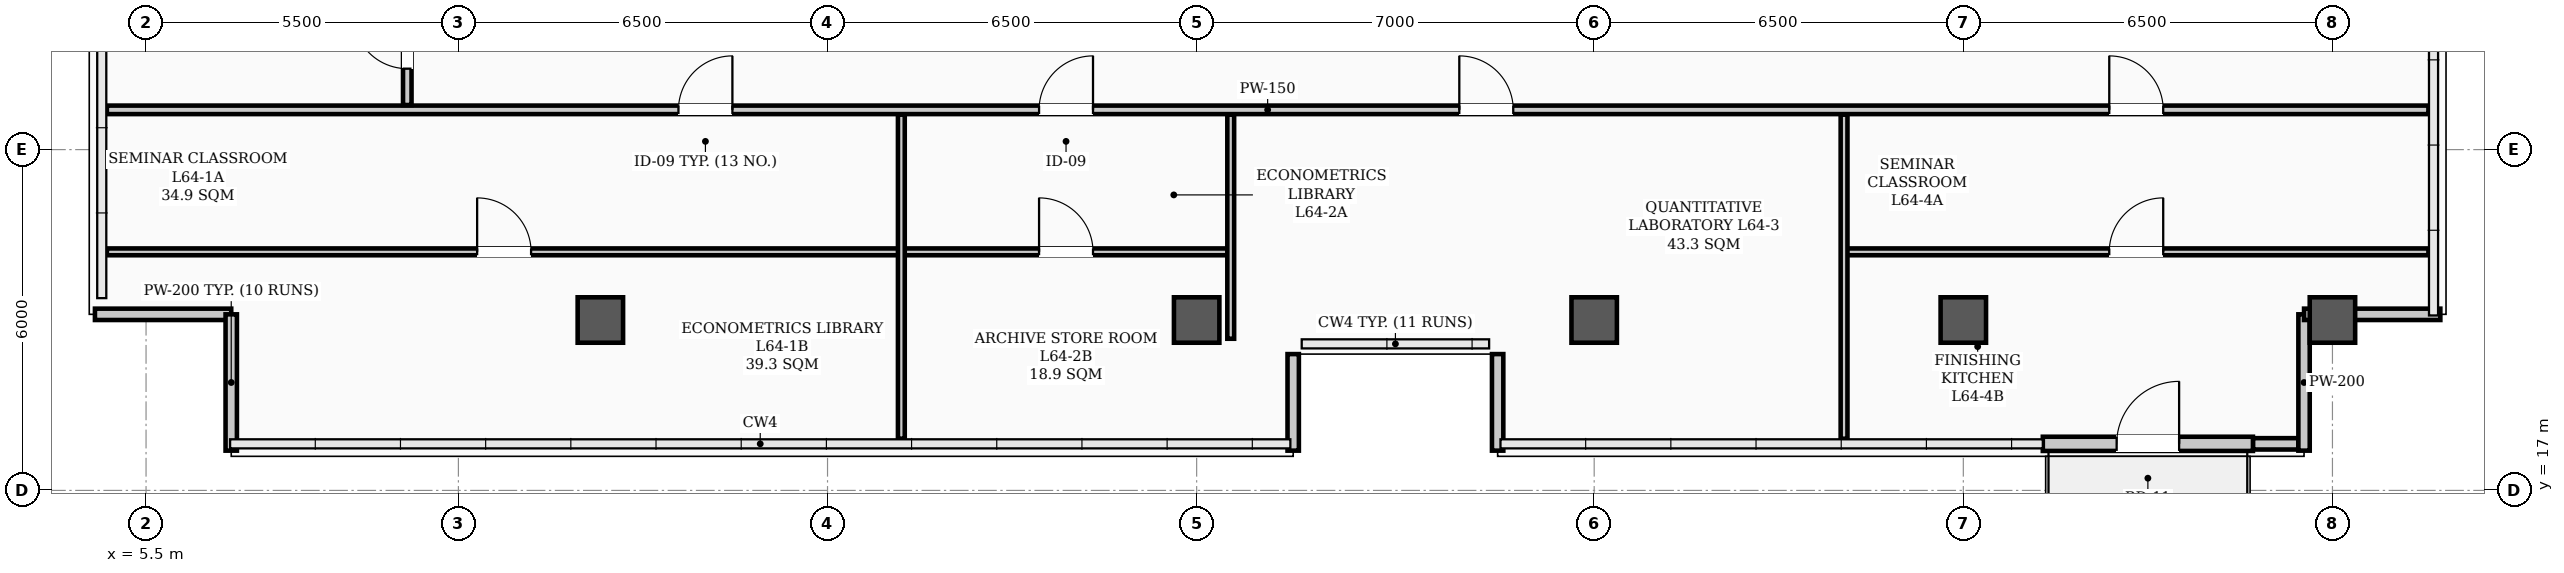
"""IFC4 building model, lengths in metres.
Left out: names, types, materials, properties, quantities, classifications, styles, units other than length and angle.
Written with IfcOpenShell. Run it as: python <this file> out.ifc"""

import sys

from ifc_helpers import new_model, si_unit, direction, frame, frame_2d, origin, origin_2d, place, context, subcontext, project, spatial, rectangle, hollow_rectangle, extrude, element, fill, save


model = new_model("IFC4")
c1 = context("Model", 3, precision=1e-05, world=origin(), true_north=direction((0.0, 1.0)))
c2 = subcontext(c1, "Body", "Model", "MODEL_VIEW")
j1 = project(units=[si_unit("LENGTHUNIT", "METRE"), si_unit("PLANEANGLEUNIT", "RADIAN")], contexts=[c1])
p1 = place(None, origin())
s1 = spatial("IfcSite", under=j1, at=p1, CompositionType="ELEMENT")
p2 = place(p1, origin())
s2 = spatial("IfcBuilding", under=s1, at=p2, CompositionType="ELEMENT")
p3 = place(p2, frame((0.0, 0.0, 257.9)))
s3 = spatial("IfcBuildingStorey", under=s2, at=p3, CompositionType="ELEMENT", Elevation=257.9)
for number, where, z_axis, x_axis in (
    (1, (13.5, 20.0, 0.0), (0.0, 0.0, 1.0), (1.0, 0.0, 0.0)),
    (2, (24.0, 20.0, 0.0), (0.0, 0.0, 1.0), (1.0, 0.0, 0.0)),
    (3, (31.0, 20.0, 0.0), (0.0, 0.0, 1.0), (1.0, 0.0, 0.0)),
    (4, (37.5, 20.0, 0.0), (0.0, 0.0, 1.0), (1.0, 0.0, 0.0)),
    (5, (44.0, 20.0, 0.0), (0.0, 0.0, 1.0), (1.0, 0.0, 0.0)),
):
    element("IfcColumn", number, at=place(p3, frame(where, z_axis=z_axis, x_axis=x_axis)), inside=s3, PredefinedType="COLUMN", context=c2, shape_type="SweptSolid", body=[
        extrude(hollow_rectangle(XDim=0.8, YDim=0.8, WallThickness=0.032, InnerFilletRadius=0.016, OuterFilletRadius=0.048, at=origin_2d()), origin(), (0.0, 0.0, 1.0), 3.9),
    ])
p4 = place(p3, frame((42.6, 17.82, 0.0), z_axis=(0.0, 0.0, 1.0), x_axis=(1.0, 0.0, 0.0)))
e6 = element("IfcWall", 6, at=p4, inside=s3, PredefinedType="PARAPET", context=c2, shape_type="SweptSolid", body=[
    extrude(rectangle(XDim=0.8, YDim=0.2, at=frame_2d((0.4, 0.0))), origin(), (0.0, 0.0, 1.0), 1.2),
])
p5 = place(p3, frame((4.6, 20.1, 0.0), z_axis=(0.0, 0.0, 1.0), x_axis=(1.0, 0.0, 0.0)))
e7 = element("IfcWall", 7, at=p5, inside=s3, PredefinedType="PARAPET", context=c2, shape_type="SweptSolid", body=[
    extrude(rectangle(XDim=2.4, YDim=0.2, at=frame_2d((1.2, 0.0))), origin(), (0.0, 0.0, 1.0), 1.2),
])
for number, where, z_axis, x_axis in (
    (8, (7.0, 20.1, 0.0), (0.0, 0.0, 1.0), (0.0, -1.0, 0.0)),
    (9, (43.5, 17.7, 0.0), (0.0, 0.0, 1.0), (0.0, 1.0, 0.0)),
):
    element("IfcWall", number, at=place(p3, frame(where, z_axis=z_axis, x_axis=x_axis)), inside=s3, PredefinedType="PARAPET", context=c2, shape_type="SweptSolid", body=[
        extrude(rectangle(XDim=2.4, YDim=0.2, at=frame_2d((1.2, 0.0))), origin(), (0.0, 0.0, 1.0), 1.2),
    ])
p6 = place(p3, frame((43.5, 20.1, 0.0), z_axis=(0.0, 0.0, 1.0), x_axis=(1.0, 0.0, 0.0)))
e10 = element("IfcWall", 10, at=p6, inside=s3, PredefinedType="PARAPET", context=c2, shape_type="SweptSolid", body=[
    extrude(rectangle(XDim=2.4, YDim=0.2, at=frame_2d((1.2, 0.0))), origin(), (0.0, 0.0, 1.0), 1.2),
])
for number, where, z_axis, x_axis in (
    (11, (25.7, 17.7, 0.0), (0.0, 0.0, 1.0), (0.0, 1.0, 0.0)),
    (12, (29.3, 19.4, 0.0), (0.0, 0.0, 1.0), (0.0, -1.0, 0.0)),
):
    element("IfcWall", number, at=place(p3, frame(where, z_axis=z_axis, x_axis=x_axis)), inside=s3, PredefinedType="PARAPET", context=c2, shape_type="SweptSolid", body=[
        extrude(rectangle(XDim=1.7, YDim=0.2, at=frame_2d((0.85, 0.0))), origin(), (0.0, 0.0, 1.0), 1.2),
    ])
p7 = place(p3, frame((38.9, 17.82, 0.0), z_axis=(0.0, 0.0, 1.0), x_axis=(1.0, 0.0, 0.0)))
e13 = element("IfcWall", 13, at=p7, inside=s3, PredefinedType="STANDARD", context=c2, shape_type="SweptSolid", body=[
    extrude(rectangle(XDim=3.7, YDim=0.25, at=frame_2d((1.85, 0.0))), origin(), (0.0, 0.0, 1.0), 3.18),
])
p8 = place(p7, frame((1.3, 0.0, 0.0)))
e14 = element("IfcOpeningElement", 14, at=p8, cuts=e13, PredefinedType="OPENING", context=c2, shape_type="SweptSolid", body=[
    extrude(rectangle(XDim=1.1, YDim=2.2, at=frame_2d((0.55, 1.1))), frame((0.0, 0.135, 0.0), z_axis=(0.0, -1.0, 0.0), x_axis=(1.0, 0.0, 0.0)), (0.0, 0.0, 1.0), 0.27),
])
p9 = place(p3, frame((4.81, 23.7, 0.0), z_axis=(0.0, 0.0, 1.0), x_axis=(1.0, 0.0, 0.0)))
e15 = element("IfcWall", 15, at=p9, inside=s3, PredefinedType="PARTITIONING", context=c2, shape_type="SweptSolid", body=[
    extrude(rectangle(XDim=40.88, YDim=0.15, at=frame_2d((20.44, 0.0))), origin(), (0.0, 0.0, 1.0), 3.2),
])
p10 = place(p9, frame((10.065, 0.0, 0.0)))
e16 = element("IfcOpeningElement", 16, at=p10, cuts=e15, PredefinedType="OPENING", context=c2, shape_type="SweptSolid", body=[
    extrude(rectangle(XDim=0.95, YDim=2.08, at=frame_2d((0.475, 1.04))), frame((0.0, 0.085, 0.0), z_axis=(0.0, -1.0, 0.0), x_axis=(1.0, 0.0, 0.0)), (0.0, 0.0, 1.0), 0.17),
])
p11 = place(p9, frame((16.415, 0.0, 0.0)))
e17 = element("IfcOpeningElement", 17, at=p11, cuts=e15, PredefinedType="OPENING", context=c2, shape_type="SweptSolid", body=[
    extrude(rectangle(XDim=0.95, YDim=2.08, at=frame_2d((0.475, 1.04))), frame((0.0, 0.085, 0.0), z_axis=(0.0, -1.0, 0.0), x_axis=(1.0, 0.0, 0.0)), (0.0, 0.0, 1.0), 0.17),
])
p12 = place(p9, frame((23.815, 0.0, 0.0)))
e18 = element("IfcOpeningElement", 18, at=p12, cuts=e15, PredefinedType="OPENING", context=c2, shape_type="SweptSolid", body=[
    extrude(rectangle(XDim=0.95, YDim=2.08, at=frame_2d((0.475, 1.04))), frame((0.0, 0.085, 0.0), z_axis=(0.0, -1.0, 0.0), x_axis=(1.0, 0.0, 0.0)), (0.0, 0.0, 1.0), 0.17),
])
p13 = place(p9, frame((35.26, 0.0, 0.0)))
e19 = element("IfcOpeningElement", 19, at=p13, cuts=e15, PredefinedType="OPENING", context=c2, shape_type="SweptSolid", body=[
    extrude(rectangle(XDim=0.95, YDim=2.08, at=frame_2d((0.475, 1.04))), frame((0.0, 0.085, 0.0), z_axis=(0.0, -1.0, 0.0), x_axis=(1.0, 0.0, 0.0)), (0.0, 0.0, 1.0), 0.17),
])
p14 = place(p3, frame((4.81, 21.2, 0.0), z_axis=(0.0, 0.0, 1.0), x_axis=(1.0, 0.0, 0.0)))
e20 = element("IfcWall", 20, at=p14, inside=s3, PredefinedType="PARTITIONING", context=c2, shape_type="SweptSolid", body=[
    extrude(rectangle(XDim=13.99, YDim=0.12, at=frame_2d((6.995, 0.0))), origin(), (0.0, 0.0, 1.0), 3.2),
])
p15 = place(p14, frame((6.52, 0.0, 0.0)))
e21 = element("IfcOpeningElement", 21, at=p15, cuts=e20, PredefinedType="OPENING", context=c2, shape_type="SweptSolid", body=[
    extrude(rectangle(XDim=0.95, YDim=2.08, at=frame_2d((0.475, 1.04))), frame((0.0, 0.07, 0.0), z_axis=(0.0, -1.0, 0.0), x_axis=(1.0, 0.0, 0.0)), (0.0, 0.0, 1.0), 0.14),
])
p16 = place(p3, frame((18.8, 21.2, 0.0), z_axis=(0.0, 0.0, 1.0), x_axis=(1.0, 0.0, 0.0)))
e22 = element("IfcWall", 22, at=p16, inside=s3, PredefinedType="PARTITIONING", context=c2, shape_type="SweptSolid", body=[
    extrude(rectangle(XDim=5.8, YDim=0.12, at=frame_2d((2.9, 0.0))), origin(), (0.0, 0.0, 1.0), 3.2),
])
p17 = place(p16, frame((2.425, 0.0, 0.0)))
e23 = element("IfcOpeningElement", 23, at=p17, cuts=e22, PredefinedType="OPENING", context=c2, shape_type="SweptSolid", body=[
    extrude(rectangle(XDim=0.95, YDim=2.08, at=frame_2d((0.475, 1.04))), frame((0.0, 0.07, 0.0), z_axis=(0.0, -1.0, 0.0), x_axis=(1.0, 0.0, 0.0)), (0.0, 0.0, 1.0), 0.14),
])
p18 = place(p3, frame((35.4, 21.2, 0.0), z_axis=(0.0, 0.0, 1.0), x_axis=(1.0, 0.0, 0.0)))
e24 = element("IfcWall", 24, at=p18, inside=s3, PredefinedType="PARTITIONING", context=c2, shape_type="SweptSolid", body=[
    extrude(rectangle(XDim=10.29, YDim=0.12, at=frame_2d((5.145, 0.0))), origin(), (0.0, 0.0, 1.0), 3.2),
])
p19 = place(p18, frame((4.67, 0.0, 0.0)))
e25 = element("IfcOpeningElement", 25, at=p19, cuts=e24, PredefinedType="OPENING", context=c2, shape_type="SweptSolid", body=[
    extrude(rectangle(XDim=0.95, YDim=2.08, at=frame_2d((0.475, 1.04))), frame((0.0, 0.07, 0.0), z_axis=(0.0, -1.0, 0.0), x_axis=(1.0, 0.0, 0.0)), (0.0, 0.0, 1.0), 0.14),
])
p20 = place(p3, frame((10.1, 23.785, 0.0), z_axis=(0.0, 0.0, 1.0), x_axis=(0.0, 1.0, 0.0)))
e26 = element("IfcWall", 26, at=p20, inside=s3, PredefinedType="PARTITIONING", context=c2, shape_type="SweptSolid", body=[
    extrude(rectangle(XDim=17.88, YDim=0.15, at=frame_2d((8.94, 0.0))), origin(), (0.0, 0.0, 1.0), 3.1),
])
p21 = place(p20, frame((0.64, 0.0, 0.0)))
e27 = element("IfcOpeningElement", 27, at=p21, cuts=e26, PredefinedType="OPENING", context=c2, shape_type="SweptSolid", body=[
    extrude(rectangle(XDim=0.95, YDim=2.08, at=frame_2d((0.475, 1.04))), frame((0.0, 0.085, 0.0), z_axis=(0.0, -1.0, 0.0), x_axis=(1.0, 0.0, 0.0)), (0.0, 0.0, 1.0), 0.17),
])
p22 = place(p20, frame((13.015, 0.0, 0.0)))
e28 = element("IfcOpeningElement", 28, at=p22, cuts=e26, PredefinedType="OPENING", context=c2, shape_type="SweptSolid", body=[
    extrude(rectangle(XDim=0.95, YDim=2.08, at=frame_2d((0.475, 1.04))), frame((0.0, 0.085, 0.0), z_axis=(0.0, -1.0, 0.0), x_axis=(1.0, 0.0, 0.0)), (0.0, 0.0, 1.0), 0.17),
])
p23 = place(p3, frame((18.8, 17.91, 0.0), z_axis=(0.0, 0.0, 1.0), x_axis=(0.0, 1.0, 0.0)))
e29 = element("IfcWall", 29, at=p23, inside=s3, PredefinedType="PARTITIONING", context=c2, shape_type="SweptSolid", body=[
    extrude(rectangle(XDim=5.705, YDim=0.12, at=frame_2d((2.853, 0.0))), origin(), (0.0, 0.0, 1.0), 3.1),
])
p24 = place(p3, frame((24.6, 19.67, 0.0), z_axis=(0.0, 0.0, 1.0), x_axis=(0.0, 1.0, 0.0)))
e30 = element("IfcWall", 30, at=p24, inside=s3, PredefinedType="PARTITIONING", context=c2, shape_type="SweptSolid", body=[
    extrude(rectangle(XDim=3.945, YDim=0.12, at=frame_2d((1.973, 0.0))), origin(), (0.0, 0.0, 1.0), 3.1),
])
p25 = place(p3, frame((35.4, 17.91, 0.0), z_axis=(0.0, 0.0, 1.0), x_axis=(0.0, 1.0, 0.0)))
e31 = element("IfcWall", 31, at=p25, inside=s3, PredefinedType="PARTITIONING", context=c2, shape_type="SweptSolid", body=[
    extrude(rectangle(XDim=5.705, YDim=0.12, at=frame_2d((2.853, 0.0))), origin(), (0.0, 0.0, 1.0), 3.1),
])
p26 = place(p8, origin())
e32 = element("IfcDoor", 32, at=p26, inside=s3, OperationType="SINGLE_SWING_RIGHT", PredefinedType="DOOR", context=c2, shape_type="SweptSolid", body=[
    extrude(rectangle(XDim=1.1, YDim=2.2, at=frame_2d((0.55, 1.1))), frame((0.0, 0.025, 0.0), z_axis=(0.0, -1.0, 0.0), x_axis=(1.0, 0.0, 0.0)), (0.0, 0.0, 1.0), 0.05),
])
fill(e14, e32)
p27 = place(p15, origin())
e33 = element("IfcDoor", 33, at=p27, inside=s3, OperationType="SINGLE_SWING_LEFT", PredefinedType="DOOR", context=c2, shape_type="SweptSolid", body=[
    extrude(rectangle(XDim=0.95, YDim=2.08, at=frame_2d((0.475, 1.04))), frame((0.0, 0.025, 0.0), z_axis=(0.0, -1.0, 0.0), x_axis=(1.0, 0.0, 0.0)), (0.0, 0.0, 1.0), 0.05),
])
fill(e21, e33)
p28 = place(p10, origin())
e34 = element("IfcDoor", 34, at=p28, inside=s3, OperationType="SINGLE_SWING_RIGHT", PredefinedType="DOOR", context=c2, shape_type="SweptSolid", body=[
    extrude(rectangle(XDim=0.95, YDim=2.08, at=frame_2d((0.475, 1.04))), frame((0.0, 0.025, 0.0), z_axis=(0.0, -1.0, 0.0), x_axis=(1.0, 0.0, 0.0)), (0.0, 0.0, 1.0), 0.05),
])
fill(e16, e34)
p29 = place(p17, origin())
e35 = element("IfcDoor", 35, at=p29, inside=s3, OperationType="SINGLE_SWING_LEFT", PredefinedType="DOOR", context=c2, shape_type="SweptSolid", body=[
    extrude(rectangle(XDim=0.95, YDim=2.08, at=frame_2d((0.475, 1.04))), frame((0.0, 0.025, 0.0), z_axis=(0.0, -1.0, 0.0), x_axis=(1.0, 0.0, 0.0)), (0.0, 0.0, 1.0), 0.05),
])
fill(e23, e35)
p30 = place(p11, origin())
e36 = element("IfcDoor", 36, at=p30, inside=s3, OperationType="SINGLE_SWING_RIGHT", PredefinedType="DOOR", context=c2, shape_type="SweptSolid", body=[
    extrude(rectangle(XDim=0.95, YDim=2.08, at=frame_2d((0.475, 1.04))), frame((0.0, 0.025, 0.0), z_axis=(0.0, -1.0, 0.0), x_axis=(1.0, 0.0, 0.0)), (0.0, 0.0, 1.0), 0.05),
])
fill(e17, e36)
p31 = place(p12, origin())
e37 = element("IfcDoor", 37, at=p31, inside=s3, OperationType="SINGLE_SWING_LEFT", PredefinedType="DOOR", context=c2, shape_type="SweptSolid", body=[
    extrude(rectangle(XDim=0.95, YDim=2.08, at=frame_2d((0.475, 1.04))), frame((0.0, 0.025, 0.0), z_axis=(0.0, -1.0, 0.0), x_axis=(1.0, 0.0, 0.0)), (0.0, 0.0, 1.0), 0.05),
])
fill(e18, e37)
p32 = place(p19, origin())
e38 = element("IfcDoor", 38, at=p32, inside=s3, OperationType="SINGLE_SWING_RIGHT", PredefinedType="DOOR", context=c2, shape_type="SweptSolid", body=[
    extrude(rectangle(XDim=0.95, YDim=2.08, at=frame_2d((0.475, 1.04))), frame((0.0, 0.025, 0.0), z_axis=(0.0, -1.0, 0.0), x_axis=(1.0, 0.0, 0.0)), (0.0, 0.0, 1.0), 0.05),
])
fill(e25, e38)
p33 = place(p13, origin())
e39 = element("IfcDoor", 39, at=p33, inside=s3, OperationType="SINGLE_SWING_LEFT", PredefinedType="DOOR", context=c2, shape_type="SweptSolid", body=[
    extrude(rectangle(XDim=0.95, YDim=2.08, at=frame_2d((0.475, 1.04))), frame((0.0, 0.025, 0.0), z_axis=(0.0, -1.0, 0.0), x_axis=(1.0, 0.0, 0.0)), (0.0, 0.0, 1.0), 0.05),
])
fill(e19, e39)
p34 = place(p21, origin())
e40 = element("IfcDoor", 40, at=p34, inside=s3, OperationType="SINGLE_SWING_RIGHT", PredefinedType="DOOR", context=c2, shape_type="SweptSolid", body=[
    extrude(rectangle(XDim=0.95, YDim=2.08, at=frame_2d((0.475, 1.04))), frame((0.0, 0.025, 0.0), z_axis=(0.0, -1.0, 0.0), x_axis=(1.0, 0.0, 0.0)), (0.0, 0.0, 1.0), 0.05),
])
fill(e27, e40)
save(model, sys.argv[1])
